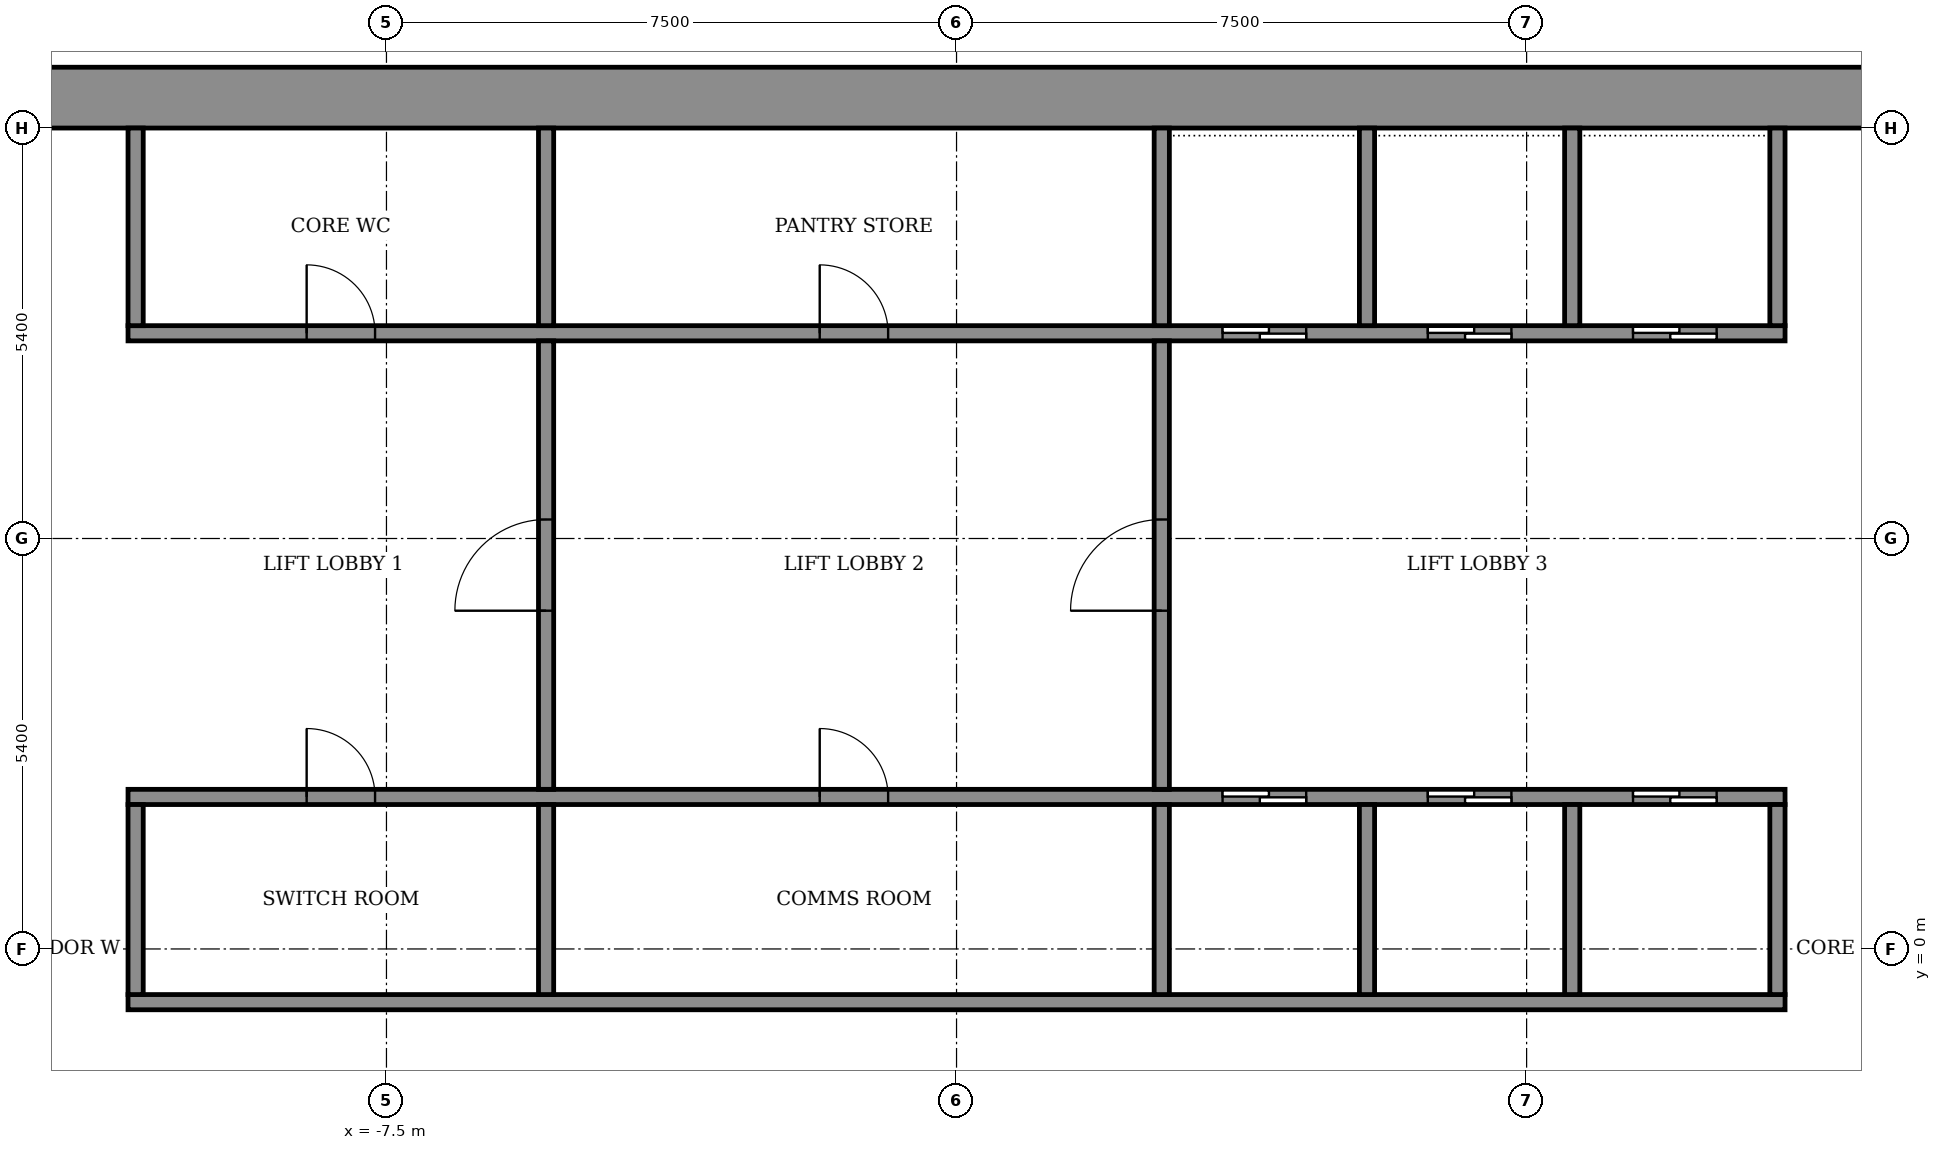
"""IFC4 building model, lengths in metres.
Left out: names, types, materials, properties, quantities, classifications, styles, units other than length and angle.
Written with IfcOpenShell. Run it as: python <this file> out.ifc"""

import sys

from ifc_helpers import new_model, si_unit, direction, frame, frame_2d, origin, place, context, subcontext, project, spatial, rectangle, extrude, element, fill, save


model = new_model("IFC4")
c1 = context("Model", 3, precision=1e-05, world=origin(), true_north=direction((0.0, 1.0)))
c2 = subcontext(c1, "Body", "Model", "MODEL_VIEW")
j1 = project(units=[si_unit("LENGTHUNIT", "METRE"), si_unit("PLANEANGLEUNIT", "RADIAN")], contexts=[c1])
p1 = place(None, origin())
s1 = spatial("IfcSite", under=j1, at=p1, CompositionType="ELEMENT")
p2 = place(p1, origin())
s2 = spatial("IfcBuilding", under=s1, at=p2, CompositionType="ELEMENT")
p3 = place(p2, frame((0.0, 0.0, 208.7)))
s3 = spatial("IfcBuildingStorey", under=s2, at=p3, CompositionType="ELEMENT", Elevation=208.7)
p4 = place(p3, frame((-14.6, 11.2, 0.0), z_axis=(0.0, 0.0, 1.0), x_axis=(1.0, 0.0, 0.0)))
e1 = element("IfcWall", 1, at=p4, inside=s3, PredefinedType="SHEAR", context=c2, shape_type="SweptSolid", body=[
    extrude(rectangle(XDim=29.2, YDim=0.8, at=frame_2d((14.6, 0.0))), origin(), (0.0, 0.0, 1.0), 3.6),
])
p5 = place(p3, frame((-10.9, -0.7, 0.0), z_axis=(0.0, 0.0, 1.0), x_axis=(1.0, 0.0, 0.0)))
e2 = element("IfcWall", 2, at=p5, inside=s3, PredefinedType="SHEAR", context=c2, shape_type="SweptSolid", body=[
    extrude(rectangle(XDim=21.8, YDim=0.2, at=frame_2d((10.9, 0.0))), origin(), (0.0, 0.0, 1.0), 3.05),
])
p6 = place(p3, frame((-10.9, 2.0, 0.0), z_axis=(0.0, 0.0, 1.0), x_axis=(1.0, 0.0, 0.0)))
e3 = element("IfcWall", 3, at=p6, inside=s3, PredefinedType="SHEAR", context=c2, shape_type="SweptSolid", body=[
    extrude(rectangle(XDim=21.8, YDim=0.2, at=frame_2d((10.9, 0.0))), origin(), (0.0, 0.0, 1.0), 3.05),
])
p7 = place(p6, frame((14.4, 0.0, 0.0)))
e4 = element("IfcOpeningElement", 4, at=p7, cuts=e3, PredefinedType="OPENING", context=c2, shape_type="SweptSolid", body=[
    extrude(rectangle(XDim=1.1, YDim=2.1, at=frame_2d((0.55, 1.05))), frame((0.0, 0.11, 0.0), z_axis=(0.0, -1.0, 0.0), x_axis=(1.0, 0.0, 0.0)), (0.0, 0.0, 1.0), 0.22),
])
p8 = place(p6, frame((17.1, 0.0, 0.0)))
e5 = element("IfcOpeningElement", 5, at=p8, cuts=e3, PredefinedType="OPENING", context=c2, shape_type="SweptSolid", body=[
    extrude(rectangle(XDim=1.1, YDim=2.1, at=frame_2d((0.55, 1.05))), frame((0.0, 0.11, 0.0), z_axis=(0.0, -1.0, 0.0), x_axis=(1.0, 0.0, 0.0)), (0.0, 0.0, 1.0), 0.22),
])
p9 = place(p6, frame((19.8, 0.0, 0.0)))
e6 = element("IfcOpeningElement", 6, at=p9, cuts=e3, PredefinedType="OPENING", context=c2, shape_type="SweptSolid", body=[
    extrude(rectangle(XDim=1.1, YDim=2.1, at=frame_2d((0.55, 1.05))), frame((0.0, 0.11, 0.0), z_axis=(0.0, -1.0, 0.0), x_axis=(1.0, 0.0, 0.0)), (0.0, 0.0, 1.0), 0.22),
])
p10 = place(p6, frame((2.35, 0.0, 0.0)))
e7 = element("IfcOpeningElement", 7, at=p10, cuts=e3, PredefinedType="OPENING", context=c2, shape_type="SweptSolid", body=[
    extrude(rectangle(XDim=0.9, YDim=2.1, at=frame_2d((0.45, 1.05))), frame((0.0, 0.11, 0.0), z_axis=(0.0, -1.0, 0.0), x_axis=(1.0, 0.0, 0.0)), (0.0, 0.0, 1.0), 0.22),
])
p11 = place(p6, frame((9.1, 0.0, 0.0)))
e8 = element("IfcOpeningElement", 8, at=p11, cuts=e3, PredefinedType="OPENING", context=c2, shape_type="SweptSolid", body=[
    extrude(rectangle(XDim=0.9, YDim=2.1, at=frame_2d((0.45, 1.05))), frame((0.0, 0.11, 0.0), z_axis=(0.0, -1.0, 0.0), x_axis=(1.0, 0.0, 0.0)), (0.0, 0.0, 1.0), 0.22),
])
p12 = place(p3, frame((-10.9, 8.1, 0.0), z_axis=(0.0, 0.0, 1.0), x_axis=(1.0, 0.0, 0.0)))
e9 = element("IfcWall", 9, at=p12, inside=s3, PredefinedType="SHEAR", context=c2, shape_type="SweptSolid", body=[
    extrude(rectangle(XDim=21.8, YDim=0.2, at=frame_2d((10.9, 0.0))), origin(), (0.0, 0.0, 1.0), 3.05),
])
p13 = place(p12, frame((14.4, 0.0, 0.0)))
e10 = element("IfcOpeningElement", 10, at=p13, cuts=e9, PredefinedType="OPENING", context=c2, shape_type="SweptSolid", body=[
    extrude(rectangle(XDim=1.1, YDim=2.1, at=frame_2d((0.55, 1.05))), frame((0.0, 0.11, 0.0), z_axis=(0.0, -1.0, 0.0), x_axis=(1.0, 0.0, 0.0)), (0.0, 0.0, 1.0), 0.22),
])
p14 = place(p12, frame((17.1, 0.0, 0.0)))
e11 = element("IfcOpeningElement", 11, at=p14, cuts=e9, PredefinedType="OPENING", context=c2, shape_type="SweptSolid", body=[
    extrude(rectangle(XDim=1.1, YDim=2.1, at=frame_2d((0.55, 1.05))), frame((0.0, 0.11, 0.0), z_axis=(0.0, -1.0, 0.0), x_axis=(1.0, 0.0, 0.0)), (0.0, 0.0, 1.0), 0.22),
])
p15 = place(p12, frame((19.8, 0.0, 0.0)))
e12 = element("IfcOpeningElement", 12, at=p15, cuts=e9, PredefinedType="OPENING", context=c2, shape_type="SweptSolid", body=[
    extrude(rectangle(XDim=1.1, YDim=2.1, at=frame_2d((0.55, 1.05))), frame((0.0, 0.11, 0.0), z_axis=(0.0, -1.0, 0.0), x_axis=(1.0, 0.0, 0.0)), (0.0, 0.0, 1.0), 0.22),
])
p16 = place(p12, frame((2.35, 0.0, 0.0)))
e13 = element("IfcOpeningElement", 13, at=p16, cuts=e9, PredefinedType="OPENING", context=c2, shape_type="SweptSolid", body=[
    extrude(rectangle(XDim=0.9, YDim=2.1, at=frame_2d((0.45, 1.05))), frame((0.0, 0.11, 0.0), z_axis=(0.0, -1.0, 0.0), x_axis=(1.0, 0.0, 0.0)), (0.0, 0.0, 1.0), 0.22),
])
p17 = place(p12, frame((9.1, 0.0, 0.0)))
e14 = element("IfcOpeningElement", 14, at=p17, cuts=e9, PredefinedType="OPENING", context=c2, shape_type="SweptSolid", body=[
    extrude(rectangle(XDim=0.9, YDim=2.1, at=frame_2d((0.45, 1.05))), frame((0.0, 0.11, 0.0), z_axis=(0.0, -1.0, 0.0), x_axis=(1.0, 0.0, 0.0)), (0.0, 0.0, 1.0), 0.22),
])
for number, where, z_axis, x_axis in (
    (15, (-10.8, -0.6, 0.0), (0.0, 0.0, 1.0), (0.0, 1.0, 0.0)),
    (16, (-5.4, -0.6, 0.0), (0.0, 0.0, 1.0), (0.0, 1.0, 0.0)),
):
    element("IfcWall", number, at=place(p3, frame(where, z_axis=z_axis, x_axis=x_axis)), inside=s3, PredefinedType="STANDARD", context=c2, shape_type="SweptSolid", body=[
        extrude(rectangle(XDim=2.5, YDim=0.2, at=frame_2d((1.25, 0.0))), origin(), (0.0, 0.0, 1.0), 3.05),
    ])
for number, where, z_axis, x_axis in (
    (17, (2.7, -0.6, 0.0), (0.0, 0.0, 1.0), (0.0, 1.0, 0.0)),
    (18, (5.4, -0.6, 0.0), (0.0, 0.0, 1.0), (0.0, 1.0, 0.0)),
    (19, (8.1, -0.6, 0.0), (0.0, 0.0, 1.0), (0.0, 1.0, 0.0)),
    (20, (10.8, -0.6, 0.0), (0.0, 0.0, 1.0), (0.0, 1.0, 0.0)),
):
    element("IfcWall", number, at=place(p3, frame(where, z_axis=z_axis, x_axis=x_axis)), inside=s3, PredefinedType="SHEAR", context=c2, shape_type="SweptSolid", body=[
        extrude(rectangle(XDim=2.5, YDim=0.2, at=frame_2d((1.25, 0.0))), origin(), (0.0, 0.0, 1.0), 3.05),
    ])
for number, where, z_axis, x_axis in (
    (21, (-10.8, 8.2, 0.0), (0.0, 0.0, 1.0), (0.0, 1.0, 0.0)),
    (22, (-5.4, 8.2, 0.0), (0.0, 0.0, 1.0), (0.0, 1.0, 0.0)),
):
    element("IfcWall", number, at=place(p3, frame(where, z_axis=z_axis, x_axis=x_axis)), inside=s3, PredefinedType="STANDARD", context=c2, shape_type="SweptSolid", body=[
        extrude(rectangle(XDim=2.6, YDim=0.2, at=frame_2d((1.3, 0.0))), origin(), (0.0, 0.0, 1.0), 3.05),
    ])
for number, where, z_axis, x_axis in (
    (23, (2.7, 8.2, 0.0), (0.0, 0.0, 1.0), (0.0, 1.0, 0.0)),
    (24, (5.4, 8.2, 0.0), (0.0, 0.0, 1.0), (0.0, 1.0, 0.0)),
    (25, (8.1, 8.2, 0.0), (0.0, 0.0, 1.0), (0.0, 1.0, 0.0)),
    (26, (10.8, 8.2, 0.0), (0.0, 0.0, 1.0), (0.0, 1.0, 0.0)),
):
    element("IfcWall", number, at=place(p3, frame(where, z_axis=z_axis, x_axis=x_axis)), inside=s3, PredefinedType="SHEAR", context=c2, shape_type="SweptSolid", body=[
        extrude(rectangle(XDim=2.6, YDim=0.2, at=frame_2d((1.3, 0.0))), origin(), (0.0, 0.0, 1.0), 3.05),
    ])
p18 = place(p3, frame((-5.4, 2.1, 0.0), z_axis=(0.0, 0.0, 1.0), x_axis=(0.0, 1.0, 0.0)))
e27 = element("IfcWall", 27, at=p18, inside=s3, PredefinedType="STANDARD", context=c2, shape_type="SweptSolid", body=[
    extrude(rectangle(XDim=5.9, YDim=0.2, at=frame_2d((2.95, 0.0))), origin(), (0.0, 0.0, 1.0), 3.05),
])
p19 = place(p18, frame((2.35, 0.0, 0.0)))
e28 = element("IfcOpeningElement", 28, at=p19, cuts=e27, PredefinedType="OPENING", context=c2, shape_type="SweptSolid", body=[
    extrude(rectangle(XDim=1.2, YDim=2.1, at=frame_2d((0.6, 1.05))), frame((0.0, 0.11, 0.0), z_axis=(0.0, -1.0, 0.0), x_axis=(1.0, 0.0, 0.0)), (0.0, 0.0, 1.0), 0.22),
])
p20 = place(p3, frame((2.7, 2.1, 0.0), z_axis=(0.0, 0.0, 1.0), x_axis=(0.0, 1.0, 0.0)))
e29 = element("IfcWall", 29, at=p20, inside=s3, PredefinedType="STANDARD", context=c2, shape_type="SweptSolid", body=[
    extrude(rectangle(XDim=5.9, YDim=0.2, at=frame_2d((2.95, 0.0))), origin(), (0.0, 0.0, 1.0), 3.05),
])
p21 = place(p20, frame((2.35, 0.0, 0.0)))
e30 = element("IfcOpeningElement", 30, at=p21, cuts=e29, PredefinedType="OPENING", context=c2, shape_type="SweptSolid", body=[
    extrude(rectangle(XDim=1.2, YDim=2.1, at=frame_2d((0.6, 1.05))), frame((0.0, 0.11, 0.0), z_axis=(0.0, -1.0, 0.0), x_axis=(1.0, 0.0, 0.0)), (0.0, 0.0, 1.0), 0.22),
])
p22 = place(p7, origin())
e31 = element("IfcDoor", 31, at=p22, inside=s3, OperationType="SLIDING_TO_LEFT", PredefinedType="DOOR", context=c2, shape_type="SweptSolid", body=[
    extrude(rectangle(XDim=1.1, YDim=2.1, at=frame_2d((0.55, 1.05))), frame((0.0, 0.025, 0.0), z_axis=(0.0, -1.0, 0.0), x_axis=(1.0, 0.0, 0.0)), (0.0, 0.0, 1.0), 0.05),
])
fill(e4, e31)
p23 = place(p8, origin())
e32 = element("IfcDoor", 32, at=p23, inside=s3, OperationType="SLIDING_TO_LEFT", PredefinedType="DOOR", context=c2, shape_type="SweptSolid", body=[
    extrude(rectangle(XDim=1.1, YDim=2.1, at=frame_2d((0.55, 1.05))), frame((0.0, 0.025, 0.0), z_axis=(0.0, -1.0, 0.0), x_axis=(1.0, 0.0, 0.0)), (0.0, 0.0, 1.0), 0.05),
])
fill(e5, e32)
p24 = place(p9, origin())
e33 = element("IfcDoor", 33, at=p24, inside=s3, OperationType="SLIDING_TO_LEFT", PredefinedType="DOOR", context=c2, shape_type="SweptSolid", body=[
    extrude(rectangle(XDim=1.1, YDim=2.1, at=frame_2d((0.55, 1.05))), frame((0.0, 0.025, 0.0), z_axis=(0.0, -1.0, 0.0), x_axis=(1.0, 0.0, 0.0)), (0.0, 0.0, 1.0), 0.05),
])
fill(e6, e33)
p25 = place(p13, origin())
e34 = element("IfcDoor", 34, at=p25, inside=s3, OperationType="SLIDING_TO_LEFT", PredefinedType="DOOR", context=c2, shape_type="SweptSolid", body=[
    extrude(rectangle(XDim=1.1, YDim=2.1, at=frame_2d((0.55, 1.05))), frame((0.0, 0.025, 0.0), z_axis=(0.0, -1.0, 0.0), x_axis=(1.0, 0.0, 0.0)), (0.0, 0.0, 1.0), 0.05),
])
fill(e10, e34)
p26 = place(p14, origin())
e35 = element("IfcDoor", 35, at=p26, inside=s3, OperationType="SLIDING_TO_LEFT", PredefinedType="DOOR", context=c2, shape_type="SweptSolid", body=[
    extrude(rectangle(XDim=1.1, YDim=2.1, at=frame_2d((0.55, 1.05))), frame((0.0, 0.025, 0.0), z_axis=(0.0, -1.0, 0.0), x_axis=(1.0, 0.0, 0.0)), (0.0, 0.0, 1.0), 0.05),
])
fill(e11, e35)
p27 = place(p15, origin())
e36 = element("IfcDoor", 36, at=p27, inside=s3, OperationType="SLIDING_TO_LEFT", PredefinedType="DOOR", context=c2, shape_type="SweptSolid", body=[
    extrude(rectangle(XDim=1.1, YDim=2.1, at=frame_2d((0.55, 1.05))), frame((0.0, 0.025, 0.0), z_axis=(0.0, -1.0, 0.0), x_axis=(1.0, 0.0, 0.0)), (0.0, 0.0, 1.0), 0.05),
])
fill(e12, e36)
p28 = place(p10, origin())
e37 = element("IfcDoor", 37, at=p28, inside=s3, OperationType="SINGLE_SWING_LEFT", PredefinedType="DOOR", context=c2, shape_type="SweptSolid", body=[
    extrude(rectangle(XDim=0.9, YDim=2.1, at=frame_2d((0.45, 1.05))), frame((0.0, 0.025, 0.0), z_axis=(0.0, -1.0, 0.0), x_axis=(1.0, 0.0, 0.0)), (0.0, 0.0, 1.0), 0.05),
])
fill(e7, e37)
p29 = place(p11, origin())
e38 = element("IfcDoor", 38, at=p29, inside=s3, OperationType="SINGLE_SWING_LEFT", PredefinedType="DOOR", context=c2, shape_type="SweptSolid", body=[
    extrude(rectangle(XDim=0.9, YDim=2.1, at=frame_2d((0.45, 1.05))), frame((0.0, 0.025, 0.0), z_axis=(0.0, -1.0, 0.0), x_axis=(1.0, 0.0, 0.0)), (0.0, 0.0, 1.0), 0.05),
])
fill(e8, e38)
p30 = place(p16, origin())
e39 = element("IfcDoor", 39, at=p30, inside=s3, OperationType="SINGLE_SWING_RIGHT", PredefinedType="DOOR", context=c2, shape_type="SweptSolid", body=[
    extrude(rectangle(XDim=0.9, YDim=2.1, at=frame_2d((0.45, 1.05))), frame((0.0, 0.025, 0.0), z_axis=(0.0, -1.0, 0.0), x_axis=(1.0, 0.0, 0.0)), (0.0, 0.0, 1.0), 0.05),
])
fill(e13, e39)
p31 = place(p17, origin())
e40 = element("IfcDoor", 40, at=p31, inside=s3, OperationType="SINGLE_SWING_RIGHT", PredefinedType="DOOR", context=c2, shape_type="SweptSolid", body=[
    extrude(rectangle(XDim=0.9, YDim=2.1, at=frame_2d((0.45, 1.05))), frame((0.0, 0.025, 0.0), z_axis=(0.0, -1.0, 0.0), x_axis=(1.0, 0.0, 0.0)), (0.0, 0.0, 1.0), 0.05),
])
fill(e14, e40)
p32 = place(p19, origin())
e41 = element("IfcDoor", 41, at=p32, inside=s3, OperationType="SINGLE_SWING_LEFT", PredefinedType="DOOR", context=c2, shape_type="SweptSolid", body=[
    extrude(rectangle(XDim=1.2, YDim=2.1, at=frame_2d((0.6, 1.05))), frame((0.0, 0.025, 0.0), z_axis=(0.0, -1.0, 0.0), x_axis=(1.0, 0.0, 0.0)), (0.0, 0.0, 1.0), 0.05),
])
fill(e28, e41)
p33 = place(p21, origin())
e42 = element("IfcDoor", 42, at=p33, inside=s3, OperationType="SINGLE_SWING_LEFT", PredefinedType="DOOR", context=c2, shape_type="SweptSolid", body=[
    extrude(rectangle(XDim=1.2, YDim=2.1, at=frame_2d((0.6, 1.05))), frame((0.0, 0.025, 0.0), z_axis=(0.0, -1.0, 0.0), x_axis=(1.0, 0.0, 0.0)), (0.0, 0.0, 1.0), 0.05),
])
fill(e30, e42)
save(model, sys.argv[1])
